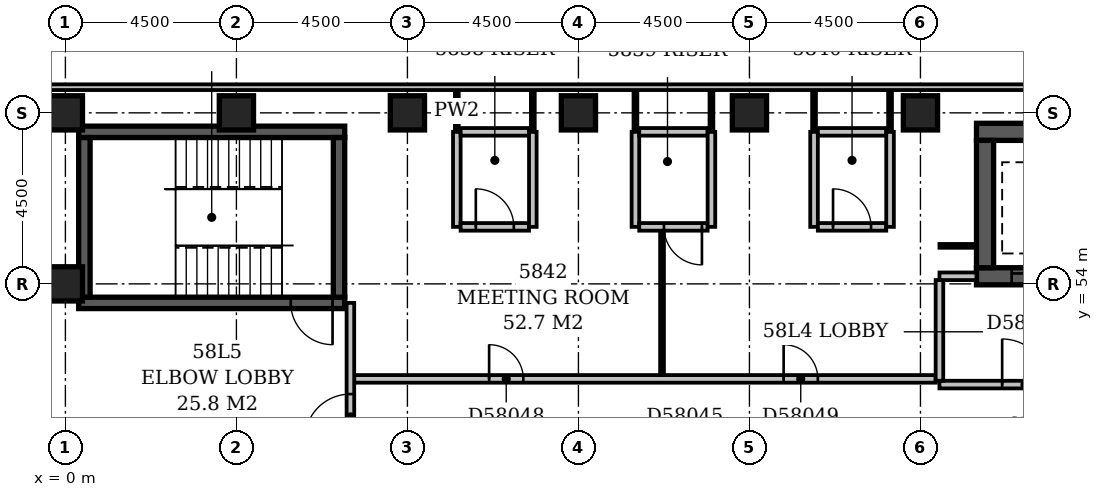
"""IFC4 building model, lengths in metres.
Left out: names, types, materials, properties, quantities, classifications, styles, units other than length and angle.
Written with IfcOpenShell. Run it as: python <this file> out.ifc"""

import sys

from ifc_helpers import new_model, si_unit, direction, frame, frame_2d, origin, origin_2d, place, context, subcontext, project, spatial, rectangle, extrude, element, fill, save


model = new_model("IFC4")
c1 = context("Model", 3, precision=1e-05, world=origin(), true_north=direction((0.0, 1.0)))
c2 = subcontext(c1, "Body", "Model", "MODEL_VIEW")
j1 = project(units=[si_unit("LENGTHUNIT", "METRE"), si_unit("PLANEANGLEUNIT", "RADIAN")], contexts=[c1])
p1 = place(None, origin())
s1 = spatial("IfcSite", under=j1, at=p1, CompositionType="ELEMENT")
p2 = place(p1, origin())
s2 = spatial("IfcBuilding", under=s1, at=p2, CompositionType="ELEMENT")
p3 = place(p2, frame((0.0, 0.0, 225.8)))
s3 = spatial("IfcBuildingStorey", under=s2, at=p3, CompositionType="ELEMENT", Elevation=225.8)
p4 = place(p3, frame((0.35, 53.5, -0.3), z_axis=(0.0, 0.0, 1.0), x_axis=(1.0, 0.0, 0.0)))
e1 = element("IfcWall", 1, at=p4, inside=s3, PredefinedType="SHEAR", context=c2, shape_type="SweptSolid", body=[
    extrude(rectangle(XDim=7.0, YDim=0.3, at=frame_2d((3.5, 0.0))), origin(), (0.0, 0.0, 1.0), 3.6),
])
p5 = place(p4, frame((5.58, 0.0, 0.3)))
e2 = element("IfcOpeningElement", 2, at=p5, cuts=e1, PredefinedType="OPENING", context=c2, shape_type="SweptSolid", body=[
    extrude(rectangle(XDim=1.1, YDim=2.1, at=frame_2d((0.55, 1.05))), frame((0.0, 0.162, 0.0), z_axis=(0.0, -1.0, 0.0), x_axis=(1.0, 0.0, 0.0)), (0.0, 0.0, 1.0), 0.324),
])
p6 = place(p3, frame((0.35, 58.0, -0.3), z_axis=(0.0, 0.0, 1.0), x_axis=(1.0, 0.0, 0.0)))
e3 = element("IfcWall", 3, at=p6, inside=s3, PredefinedType="SHEAR", context=c2, shape_type="SweptSolid", body=[
    extrude(rectangle(XDim=7.0, YDim=0.3, at=frame_2d((3.5, 0.0))), origin(), (0.0, 0.0, 1.0), 3.6),
])
for number, where, z_axis, x_axis in (
    (4, (0.5, 53.65, -0.3), (0.0, 0.0, 1.0), (0.0, 1.0, 0.0)),
    (5, (7.2, 53.65, -0.3), (0.0, 0.0, 1.0), (0.0, 1.0, 0.0)),
):
    element("IfcWall", number, at=place(p3, frame(where, z_axis=z_axis, x_axis=x_axis)), inside=s3, PredefinedType="SHEAR", context=c2, shape_type="SweptSolid", body=[
        extrude(rectangle(XDim=4.2, YDim=0.3, at=frame_2d((2.1, 0.0))), origin(), (0.0, 0.0, 1.0), 3.6),
    ])
p7 = place(p3, frame((23.975, 54.2, -0.3), z_axis=(0.0, 0.0, 1.0), x_axis=(1.0, 0.0, 0.0)))
e6 = element("IfcWall", 6, at=p7, inside=s3, PredefinedType="SHEAR", context=c2, shape_type="SweptSolid", body=[
    extrude(rectangle(XDim=2.95, YDim=0.45, at=frame_2d((1.475, 0.0))), origin(), (0.0, 0.0, 1.0), 3.6),
])
p8 = place(p7, frame((0.925, 0.0, 0.3)))
e7 = element("IfcOpeningElement", 7, at=p8, cuts=e6, PredefinedType="OPENING", context=c2, shape_type="SweptSolid", body=[
    extrude(rectangle(XDim=1.1, YDim=2.1, at=frame_2d((0.55, 1.05))), frame((0.0, 0.237, 0.0), z_axis=(0.0, -1.0, 0.0), x_axis=(1.0, 0.0, 0.0)), (0.0, 0.0, 1.0), 0.474),
])
p9 = place(p3, frame((23.975, 58.0, -0.3), z_axis=(0.0, 0.0, 1.0), x_axis=(1.0, 0.0, 0.0)))
e8 = element("IfcWall", 8, at=p9, inside=s3, PredefinedType="SHEAR", context=c2, shape_type="SweptSolid", body=[
    extrude(rectangle(XDim=2.95, YDim=0.45, at=frame_2d((1.475, 0.0))), origin(), (0.0, 0.0, 1.0), 3.6),
])
p10 = place(p3, frame((24.2, 54.425, -0.3), z_axis=(0.0, 0.0, 1.0), x_axis=(0.0, 1.0, 0.0)))
e9 = element("IfcWall", 9, at=p10, inside=s3, PredefinedType="SHEAR", context=c2, shape_type="SweptSolid", body=[
    extrude(rectangle(XDim=3.35, YDim=0.45, at=frame_2d((1.675, 0.0))), origin(), (0.0, 0.0, 1.0), 3.6),
])
for number, where, z_axis, x_axis in (
    (10, (0.0, 54.0, -0.3), (0.0, 0.0, 1.0), (1.0, 0.0, 0.0)),
    (11, (0.0, 58.5, -0.3), (0.0, 0.0, 1.0), (1.0, 0.0, 0.0)),
    (12, (4.5, 58.5, -0.3), (0.0, 0.0, 1.0), (1.0, 0.0, 0.0)),
    (13, (9.0, 58.5, -0.3), (0.0, 0.0, 1.0), (1.0, 0.0, 0.0)),
    (14, (13.5, 58.5, -0.3), (0.0, 0.0, 1.0), (1.0, 0.0, 0.0)),
    (15, (18.0, 58.5, -0.3), (0.0, 0.0, 1.0), (1.0, 0.0, 0.0)),
    (16, (22.5, 58.5, -0.3), (0.0, 0.0, 1.0), (1.0, 0.0, 0.0)),
):
    element("IfcColumn", number, at=place(p3, frame(where, z_axis=z_axis, x_axis=x_axis)), inside=s3, PredefinedType="COLUMN", context=c2, shape_type="SweptSolid", body=[
        extrude(rectangle(XDim=0.9, YDim=0.9, at=origin_2d()), origin(), (0.0, 0.0, 1.0), 3.6),
    ])
p11 = place(p3, frame((50.1, 59.175, 0.0), z_axis=(0.0, 0.0, 1.0), x_axis=(-1.0, 0.0, 0.0)))
e17 = element("IfcWall", 17, at=p11, inside=s3, PredefinedType="STANDARD", context=c2, shape_type="SweptSolid", body=[
    extrude(rectangle(XDim=50.85, YDim=0.15, at=frame_2d((25.425, 0.0))), origin(), (0.0, 0.0, 1.0), 2.7),
])
p12 = place(p3, frame((23.0, 51.35, 0.0), z_axis=(0.0, 0.0, 1.0), x_axis=(1.0, 0.0, 0.0)))
e18 = element("IfcWall", 18, at=p12, inside=s3, PredefinedType="PARTITIONING", context=c2, shape_type="SweptSolid", body=[
    extrude(rectangle(XDim=4.8, YDim=0.2, at=frame_2d((2.4, 0.0))), origin(), (0.0, 0.0, 1.0), 3.3),
])
p13 = place(p12, frame((1.65, 0.0, 0.0)))
e19 = element("IfcOpeningElement", 19, at=p13, cuts=e18, PredefinedType="OPENING", context=c2, shape_type="SweptSolid", body=[
    extrude(rectangle(XDim=1.2, YDim=2.1, at=frame_2d((0.6, 1.05))), frame((0.0, 0.112, 0.0), z_axis=(0.0, -1.0, 0.0), x_axis=(1.0, 0.0, 0.0)), (0.0, 0.0, 1.0), 0.224),
])
p14 = place(p3, frame((23.0, 54.2, 0.0), z_axis=(0.0, 0.0, 1.0), x_axis=(1.0, 0.0, 0.0)))
e20 = element("IfcWall", 20, at=p14, inside=s3, PredefinedType="PARTITIONING", context=c2, shape_type="SweptSolid", body=[
    extrude(rectangle(XDim=0.975, YDim=0.2, at=frame_2d((0.488, 0.0))), origin(), (0.0, 0.0, 1.0), 3.3),
])
p15 = place(p3, frame((23.0, 51.45, 0.0), z_axis=(0.0, 0.0, 1.0), x_axis=(0.0, 1.0, 0.0)))
e21 = element("IfcWall", 21, at=p15, inside=s3, PredefinedType="PARTITIONING", context=c2, shape_type="SweptSolid", body=[
    extrude(rectangle(XDim=2.65, YDim=0.2, at=frame_2d((1.325, 0.0))), origin(), (0.0, 0.0, 1.0), 3.3),
])
p16 = place(p3, frame((7.5, 49.6, 0.0), z_axis=(0.0, 0.0, 1.0), x_axis=(0.0, 1.0, 0.0)))
e22 = element("IfcWall", 22, at=p16, inside=s3, PredefinedType="PARTITIONING", context=c2, shape_type="SweptSolid", body=[
    extrude(rectangle(XDim=3.9, YDim=0.2, at=frame_2d((1.95, 0.0))), origin(), (0.0, 0.0, 1.0), 3.3),
])
p17 = place(p16, frame((0.3, 0.0, 0.0)))
e23 = element("IfcOpeningElement", 23, at=p17, cuts=e22, PredefinedType="OPENING", context=c2, shape_type="SweptSolid", body=[
    extrude(rectangle(XDim=1.2, YDim=2.1, at=frame_2d((0.6, 1.05))), frame((0.0, 0.112, 0.0), z_axis=(0.0, -1.0, 0.0), x_axis=(1.0, 0.0, 0.0)), (0.0, 0.0, 1.0), 0.224),
])
p18 = place(p3, frame((7.6, 51.5, 0.0), z_axis=(0.0, 0.0, 1.0), x_axis=(1.0, 0.0, 0.0)))
e24 = element("IfcWall", 24, at=p18, inside=s3, PredefinedType="PARTITIONING", context=c2, shape_type="SweptSolid", body=[
    extrude(rectangle(XDim=15.3, YDim=0.2, at=frame_2d((7.65, 0.0))), origin(), (0.0, 0.0, 1.0), 3.3),
])
p19 = place(p18, frame((3.55, 0.0, 0.0)))
e25 = element("IfcOpeningElement", 25, at=p19, cuts=e24, PredefinedType="OPENING", context=c2, shape_type="SweptSolid", body=[
    extrude(rectangle(XDim=0.9, YDim=2.1, at=frame_2d((0.45, 1.05))), frame((0.0, 0.112, 0.0), z_axis=(0.0, -1.0, 0.0), x_axis=(1.0, 0.0, 0.0)), (0.0, 0.0, 1.0), 0.224),
])
p20 = place(p18, frame((11.3, 0.0, 0.0)))
e26 = element("IfcOpeningElement", 26, at=p20, cuts=e24, PredefinedType="OPENING", context=c2, shape_type="SweptSolid", body=[
    extrude(rectangle(XDim=0.9, YDim=2.1, at=frame_2d((0.45, 1.05))), frame((0.0, 0.112, 0.0), z_axis=(0.0, -1.0, 0.0), x_axis=(1.0, 0.0, 0.0)), (0.0, 0.0, 1.0), 0.224),
])
p21 = place(p3, frame((15.7, 51.6, 0.0), z_axis=(0.0, 0.0, 1.0), x_axis=(0.0, 1.0, 0.0)))
e27 = element("IfcWall", 27, at=p21, inside=s3, PredefinedType="PARTITIONING", context=c2, shape_type="SweptSolid", body=[
    extrude(rectangle(XDim=3.8, YDim=0.1, at=frame_2d((1.9, 0.0))), origin(), (0.0, 0.0, 1.0), 3.3),
])
p22 = place(p3, frame((23.0, 55.0, 0.0), z_axis=(0.0, 0.0, 1.0), x_axis=(1.0, 0.0, 0.0)))
e28 = element("IfcWall", 28, at=p22, inside=s3, PredefinedType="PARTITIONING", context=c2, shape_type="SweptSolid", body=[
    extrude(rectangle(XDim=0.975, YDim=0.1, at=frame_2d((0.488, 0.0))), origin(), (0.0, 0.0, 1.0), 3.3),
])
p23 = place(p3, frame((10.3, 55.5, 0.0), z_axis=(0.0, 0.0, 1.0), x_axis=(0.0, 1.0, 0.0)))
e29 = element("IfcWall", 29, at=p23, inside=s3, PredefinedType="PARTITIONING", context=c2, shape_type="SweptSolid", body=[
    extrude(rectangle(XDim=2.5, YDim=0.2, at=frame_2d((1.25, 0.0))), origin(), (0.0, 0.0, 1.0), 3.3),
])
p24 = place(p3, frame((10.4, 55.5, 0.0), z_axis=(0.0, 0.0, 1.0), x_axis=(1.0, 0.0, 0.0)))
e30 = element("IfcWall", 30, at=p24, inside=s3, PredefinedType="PARTITIONING", context=c2, shape_type="SweptSolid", body=[
    extrude(rectangle(XDim=1.8, YDim=0.2, at=frame_2d((0.9, 0.0))), origin(), (0.0, 0.0, 1.0), 3.3),
])
p25 = place(p24, frame((0.4, 0.0, 0.0)))
e31 = element("IfcOpeningElement", 31, at=p25, cuts=e30, PredefinedType="OPENING", context=c2, shape_type="SweptSolid", body=[
    extrude(rectangle(XDim=1.0, YDim=2.1, at=frame_2d((0.5, 1.05))), frame((0.0, 0.112, 0.0), z_axis=(0.0, -1.0, 0.0), x_axis=(1.0, 0.0, 0.0)), (0.0, 0.0, 1.0), 0.224),
])
for number, where, z_axis, x_axis in (
    (32, (12.3, 55.5, 0.0), (0.0, 0.0, 1.0), (0.0, 1.0, 0.0)),
    (33, (15.0, 55.5, 0.0), (0.0, 0.0, 1.0), (0.0, 1.0, 0.0)),
):
    element("IfcWall", number, at=place(p3, frame(where, z_axis=z_axis, x_axis=x_axis)), inside=s3, PredefinedType="PARTITIONING", context=c2, shape_type="SweptSolid", body=[
        extrude(rectangle(XDim=2.5, YDim=0.2, at=frame_2d((1.25, 0.0))), origin(), (0.0, 0.0, 1.0), 3.3),
    ])
p26 = place(p3, frame((15.1, 55.5, 0.0), z_axis=(0.0, 0.0, 1.0), x_axis=(1.0, 0.0, 0.0)))
e34 = element("IfcWall", 34, at=p26, inside=s3, PredefinedType="PARTITIONING", context=c2, shape_type="SweptSolid", body=[
    extrude(rectangle(XDim=1.8, YDim=0.2, at=frame_2d((0.9, 0.0))), origin(), (0.0, 0.0, 1.0), 3.3),
])
p27 = place(p26, frame((0.65, 0.0, 0.0)))
e35 = element("IfcOpeningElement", 35, at=p27, cuts=e34, PredefinedType="OPENING", context=c2, shape_type="SweptSolid", body=[
    extrude(rectangle(XDim=1.0, YDim=2.1, at=frame_2d((0.5, 1.05))), frame((0.0, 0.112, 0.0), z_axis=(0.0, -1.0, 0.0), x_axis=(1.0, 0.0, 0.0)), (0.0, 0.0, 1.0), 0.224),
])
for number, where, z_axis, x_axis in (
    (36, (17.0, 55.5, 0.0), (0.0, 0.0, 1.0), (0.0, 1.0, 0.0)),
    (37, (19.7, 55.5, 0.0), (0.0, 0.0, 1.0), (0.0, 1.0, 0.0)),
):
    element("IfcWall", number, at=place(p3, frame(where, z_axis=z_axis, x_axis=x_axis)), inside=s3, PredefinedType="PARTITIONING", context=c2, shape_type="SweptSolid", body=[
        extrude(rectangle(XDim=2.5, YDim=0.2, at=frame_2d((1.25, 0.0))), origin(), (0.0, 0.0, 1.0), 3.3),
    ])
p28 = place(p3, frame((19.8, 55.5, 0.0), z_axis=(0.0, 0.0, 1.0), x_axis=(1.0, 0.0, 0.0)))
e38 = element("IfcWall", 38, at=p28, inside=s3, PredefinedType="PARTITIONING", context=c2, shape_type="SweptSolid", body=[
    extrude(rectangle(XDim=1.8, YDim=0.2, at=frame_2d((0.9, 0.0))), origin(), (0.0, 0.0, 1.0), 3.3),
])
p29 = place(p28, frame((0.4, 0.0, 0.0)))
e39 = element("IfcOpeningElement", 39, at=p29, cuts=e38, PredefinedType="OPENING", context=c2, shape_type="SweptSolid", body=[
    extrude(rectangle(XDim=1.0, YDim=2.1, at=frame_2d((0.5, 1.05))), frame((0.0, 0.112, 0.0), z_axis=(0.0, -1.0, 0.0), x_axis=(1.0, 0.0, 0.0)), (0.0, 0.0, 1.0), 0.224),
])
p30 = place(p3, frame((21.7, 55.5, 0.0), z_axis=(0.0, 0.0, 1.0), x_axis=(0.0, 1.0, 0.0)))
e40 = element("IfcWall", 40, at=p30, inside=s3, PredefinedType="PARTITIONING", context=c2, shape_type="SweptSolid", body=[
    extrude(rectangle(XDim=2.5, YDim=0.2, at=frame_2d((1.25, 0.0))), origin(), (0.0, 0.0, 1.0), 3.3),
])
p31 = place(p3, frame((10.3, 58.0, 0.0), z_axis=(0.0, 0.0, 1.0), x_axis=(0.0, 1.0, 0.0)))
e41 = element("IfcWall", 41, at=p31, inside=s3, PredefinedType="PARTITIONING", context=c2, shape_type="SweptSolid", body=[
    extrude(rectangle(XDim=1.1, YDim=0.1, at=frame_2d((0.55, 0.0))), origin(), (0.0, 0.0, 1.0), 3.3),
])
p32 = place(p3, frame((10.4, 58.0, 0.0), z_axis=(0.0, 0.0, 1.0), x_axis=(1.0, 0.0, 0.0)))
e42 = element("IfcWall", 42, at=p32, inside=s3, PredefinedType="PARTITIONING", context=c2, shape_type="SweptSolid", body=[
    extrude(rectangle(XDim=1.8, YDim=0.2, at=frame_2d((0.9, 0.0))), origin(), (0.0, 0.0, 1.0), 3.3),
])
for number, where, z_axis, x_axis in (
    (43, (12.3, 58.0, 0.0), (0.0, 0.0, 1.0), (0.0, 1.0, 0.0)),
    (44, (15.0, 58.0, 0.0), (0.0, 0.0, 1.0), (0.0, 1.0, 0.0)),
):
    element("IfcWall", number, at=place(p3, frame(where, z_axis=z_axis, x_axis=x_axis)), inside=s3, PredefinedType="PARTITIONING", context=c2, shape_type="SweptSolid", body=[
        extrude(rectangle(XDim=1.1, YDim=0.1, at=frame_2d((0.55, 0.0))), origin(), (0.0, 0.0, 1.0), 3.3),
    ])
p33 = place(p3, frame((15.1, 58.0, 0.0), z_axis=(0.0, 0.0, 1.0), x_axis=(1.0, 0.0, 0.0)))
e45 = element("IfcWall", 45, at=p33, inside=s3, PredefinedType="PARTITIONING", context=c2, shape_type="SweptSolid", body=[
    extrude(rectangle(XDim=1.8, YDim=0.2, at=frame_2d((0.9, 0.0))), origin(), (0.0, 0.0, 1.0), 3.3),
])
for number, where, z_axis, x_axis in (
    (46, (17.0, 58.0, 0.0), (0.0, 0.0, 1.0), (0.0, 1.0, 0.0)),
    (47, (19.7, 58.0, 0.0), (0.0, 0.0, 1.0), (0.0, 1.0, 0.0)),
):
    element("IfcWall", number, at=place(p3, frame(where, z_axis=z_axis, x_axis=x_axis)), inside=s3, PredefinedType="PARTITIONING", context=c2, shape_type="SweptSolid", body=[
        extrude(rectangle(XDim=1.1, YDim=0.1, at=frame_2d((0.55, 0.0))), origin(), (0.0, 0.0, 1.0), 3.3),
    ])
p34 = place(p3, frame((19.8, 58.0, 0.0), z_axis=(0.0, 0.0, 1.0), x_axis=(1.0, 0.0, 0.0)))
e48 = element("IfcWall", 48, at=p34, inside=s3, PredefinedType="PARTITIONING", context=c2, shape_type="SweptSolid", body=[
    extrude(rectangle(XDim=1.8, YDim=0.2, at=frame_2d((0.9, 0.0))), origin(), (0.0, 0.0, 1.0), 3.3),
])
p35 = place(p3, frame((21.7, 58.0, 0.0), z_axis=(0.0, 0.0, 1.0), x_axis=(0.0, 1.0, 0.0)))
e49 = element("IfcWall", 49, at=p35, inside=s3, PredefinedType="PARTITIONING", context=c2, shape_type="SweptSolid", body=[
    extrude(rectangle(XDim=1.1, YDim=0.1, at=frame_2d((0.55, 0.0))), origin(), (0.0, 0.0, 1.0), 3.3),
])
p36 = place(p17, origin())
e50 = element("IfcDoor", 50, at=p36, inside=s3, OperationType="SINGLE_SWING_LEFT", PredefinedType="DOOR", context=c2, shape_type="SweptSolid", body=[
    extrude(rectangle(XDim=1.2, YDim=2.1, at=frame_2d((0.6, 1.05))), frame((0.0, 0.025, 0.0), z_axis=(0.0, -1.0, 0.0), x_axis=(1.0, 0.0, 0.0)), (0.0, 0.0, 1.0), 0.05),
])
fill(e23, e50)
p37 = place(p13, origin())
e51 = element("IfcDoor", 51, at=p37, inside=s3, OperationType="SINGLE_SWING_LEFT", PredefinedType="DOOR", context=c2, shape_type="SweptSolid", body=[
    extrude(rectangle(XDim=1.2, YDim=2.1, at=frame_2d((0.6, 1.05))), frame((0.0, 0.025, 0.0), z_axis=(0.0, -1.0, 0.0), x_axis=(1.0, 0.0, 0.0)), (0.0, 0.0, 1.0), 0.05),
])
fill(e19, e51)
p38 = place(p8, origin())
e52 = element("IfcDoor", 52, at=p38, inside=s3, OperationType="SLIDING_TO_LEFT", PredefinedType="DOOR", context=c2, shape_type="SweptSolid", body=[
    extrude(rectangle(XDim=1.1, YDim=2.1, at=frame_2d((0.55, 1.05))), frame((0.0, 0.025, 0.0), z_axis=(0.0, -1.0, 0.0), x_axis=(1.0, 0.0, 0.0)), (0.0, 0.0, 1.0), 0.05),
])
fill(e7, e52)
p39 = place(p5, origin())
e53 = element("IfcDoor", 53, at=p39, inside=s3, OperationType="SINGLE_SWING_RIGHT", PredefinedType="DOOR", context=c2, shape_type="SweptSolid", body=[
    extrude(rectangle(XDim=1.1, YDim=2.1, at=frame_2d((0.55, 1.05))), frame((0.0, 0.025, 0.0), z_axis=(0.0, -1.0, 0.0), x_axis=(1.0, 0.0, 0.0)), (0.0, 0.0, 1.0), 0.05),
])
fill(e2, e53)
p40 = place(p19, origin())
e54 = element("IfcDoor", 54, at=p40, inside=s3, OperationType="SINGLE_SWING_LEFT", PredefinedType="DOOR", context=c2, shape_type="SweptSolid", body=[
    extrude(rectangle(XDim=0.9, YDim=2.1, at=frame_2d((0.45, 1.05))), frame((0.0, 0.025, 0.0), z_axis=(0.0, -1.0, 0.0), x_axis=(1.0, 0.0, 0.0)), (0.0, 0.0, 1.0), 0.05),
])
fill(e25, e54)
p41 = place(p20, origin())
e55 = element("IfcDoor", 55, at=p41, inside=s3, OperationType="SINGLE_SWING_LEFT", PredefinedType="DOOR", context=c2, shape_type="SweptSolid", body=[
    extrude(rectangle(XDim=0.9, YDim=2.1, at=frame_2d((0.45, 1.05))), frame((0.0, 0.025, 0.0), z_axis=(0.0, -1.0, 0.0), x_axis=(1.0, 0.0, 0.0)), (0.0, 0.0, 1.0), 0.05),
])
fill(e26, e55)
p42 = place(p25, origin())
e56 = element("IfcDoor", 56, at=p42, inside=s3, OperationType="SINGLE_SWING_LEFT", PredefinedType="DOOR", context=c2, shape_type="SweptSolid", body=[
    extrude(rectangle(XDim=1.0, YDim=2.1, at=frame_2d((0.5, 1.05))), frame((0.0, 0.025, 0.0), z_axis=(0.0, -1.0, 0.0), x_axis=(1.0, 0.0, 0.0)), (0.0, 0.0, 1.0), 0.05),
])
fill(e31, e56)
p43 = place(p27, origin())
e57 = element("IfcDoor", 57, at=p43, inside=s3, OperationType="SINGLE_SWING_RIGHT", PredefinedType="DOOR", context=c2, shape_type="SweptSolid", body=[
    extrude(rectangle(XDim=1.0, YDim=2.1, at=frame_2d((0.5, 1.05))), frame((0.0, 0.025, 0.0), z_axis=(0.0, -1.0, 0.0), x_axis=(1.0, 0.0, 0.0)), (0.0, 0.0, 1.0), 0.05),
])
fill(e35, e57)
p44 = place(p29, origin())
e58 = element("IfcDoor", 58, at=p44, inside=s3, OperationType="SINGLE_SWING_LEFT", PredefinedType="DOOR", context=c2, shape_type="SweptSolid", body=[
    extrude(rectangle(XDim=1.0, YDim=2.1, at=frame_2d((0.5, 1.05))), frame((0.0, 0.025, 0.0), z_axis=(0.0, -1.0, 0.0), x_axis=(1.0, 0.0, 0.0)), (0.0, 0.0, 1.0), 0.05),
])
fill(e39, e58)
save(model, sys.argv[1])
